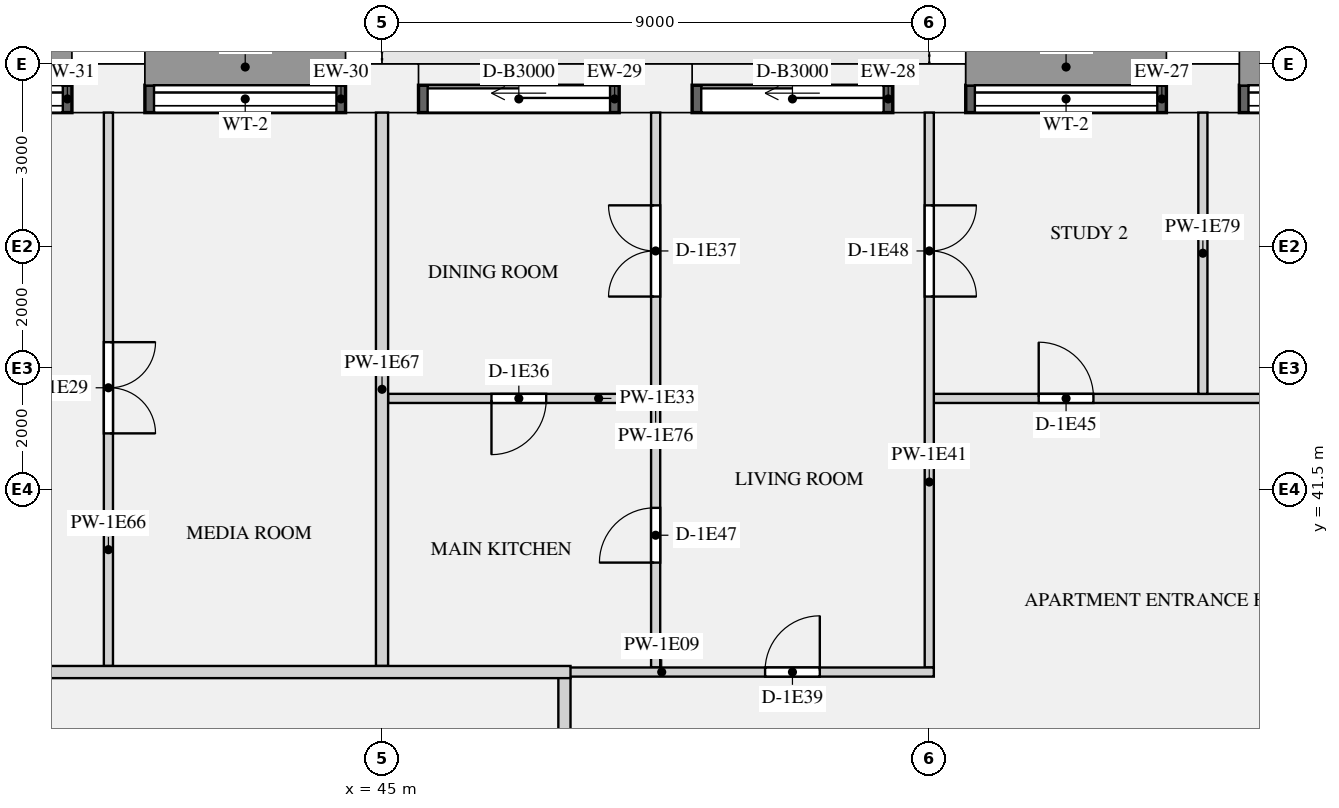
"""IFC4 building model, lengths in metres.
Left out: names, types, materials, properties, quantities, classifications, styles, units other than length and angle.
Written with IfcOpenShell. Run it as: python <this file> out.ifc"""

import sys

from ifc_helpers import new_model, si_unit, direction, frame, frame_2d, origin, origin_2d, place, context, subcontext, project, spatial, rectangle, extrude, element, fill, save


model = new_model("IFC4")
c1 = context("Model", 3, precision=1e-05, world=origin(), true_north=direction((0.0, 1.0)))
c2 = subcontext(c1, "Body", "Model", "MODEL_VIEW")
j1 = project(units=[si_unit("LENGTHUNIT", "METRE"), si_unit("PLANEANGLEUNIT", "RADIAN")], contexts=[c1])
p1 = place(None, origin())
s1 = spatial("IfcSite", under=j1, at=p1, CompositionType="ELEMENT")
p2 = place(p1, origin())
s2 = spatial("IfcBuilding", under=s1, at=p2, CompositionType="ELEMENT")
p3 = place(p2, frame((0.0, 0.0, 54.15)))
s3 = spatial("IfcBuildingStorey", under=s2, at=p3, CompositionType="ELEMENT", Elevation=54.15)
for number, where, z_axis, x_axis in (
    (1, (58.5, 48.1, 0.0), (0.0, 0.0, 1.0), (-1.0, 0.0, 0.0)),
    (2, (54.0, 48.1, 0.0), (0.0, 0.0, 1.0), (-1.0, 0.0, 0.0)),
    (3, (49.5, 48.1, 0.0), (0.0, 0.0, 1.0), (-1.0, 0.0, 0.0)),
    (4, (45.0, 48.1, 0.0), (0.0, 0.0, 1.0), (-1.0, 0.0, 0.0)),
    (5, (40.5, 48.1, 0.0), (0.0, 0.0, 1.0), (-1.0, 0.0, 0.0)),
):
    element("IfcColumn", number, at=place(p3, frame(where, z_axis=z_axis, x_axis=x_axis)), inside=s3, PredefinedType="USERDEFINED", context=c2, shape_type="SweptSolid", body=[
        extrude(rectangle(XDim=1.2, YDim=0.8, at=origin_2d()), origin(), (0.0, 0.0, 1.0), 3.15),
    ])
p4 = place(p3, frame((62.4, 47.925, 0.9), z_axis=(0.0, 0.0, 1.0), x_axis=(-1.0, 0.0, 0.0)))
e6 = element("IfcWall", 6, at=p4, inside=s3, PredefinedType="SOLIDWALL", context=c2, shape_type="SweptSolid", body=[
    extrude(rectangle(XDim=3.3, YDim=0.45, at=frame_2d((1.65, 0.0))), origin(), (0.0, 0.0, 1.0), 1.93),
])
p5 = place(p4, frame((0.15, 0.0, 0.15)))
e7 = element("IfcOpeningElement", 7, at=p5, cuts=e6, PredefinedType="OPENING", context=c2, shape_type="SweptSolid", body=[
    extrude(rectangle(XDim=3.0, YDim=1.5, at=frame_2d((1.5, 0.75))), frame((0.0, 0.235, 0.0), z_axis=(0.0, -1.0, 0.0), x_axis=(1.0, 0.0, 0.0)), (0.0, 0.0, 1.0), 0.47),
])
p6 = place(p3, frame((57.9, 47.925, 0.9), z_axis=(0.0, 0.0, 1.0), x_axis=(-1.0, 0.0, 0.0)))
e8 = element("IfcWall", 8, at=p6, inside=s3, PredefinedType="SOLIDWALL", context=c2, shape_type="SweptSolid", body=[
    extrude(rectangle(XDim=3.3, YDim=0.45, at=frame_2d((1.65, 0.0))), origin(), (0.0, 0.0, 1.0), 1.93),
])
p7 = place(p6, frame((0.15, 0.0, 0.15)))
e9 = element("IfcOpeningElement", 9, at=p7, cuts=e8, PredefinedType="OPENING", context=c2, shape_type="SweptSolid", body=[
    extrude(rectangle(XDim=3.0, YDim=1.5, at=frame_2d((1.5, 0.75))), frame((0.0, 0.235, 0.0), z_axis=(0.0, -1.0, 0.0), x_axis=(1.0, 0.0, 0.0)), (0.0, 0.0, 1.0), 0.47),
])
p8 = place(p3, frame((53.4, 47.925, 0.0), z_axis=(0.0, 0.0, 1.0), x_axis=(-1.0, 0.0, 0.0)))
e10 = element("IfcWall", 10, at=p8, inside=s3, PredefinedType="SOLIDWALL", context=c2, shape_type="SweptSolid", body=[
    extrude(rectangle(XDim=3.3, YDim=0.45, at=frame_2d((1.65, 0.0))), origin(), (0.0, 0.0, 1.0), 2.83),
])
p9 = place(p8, frame((0.15, 0.0, 0.0)))
e11 = element("IfcOpeningElement", 11, at=p9, cuts=e10, PredefinedType="OPENING", context=c2, shape_type="SweptSolid", body=[
    extrude(rectangle(XDim=3.0, YDim=2.3, at=frame_2d((1.5, 1.15))), frame((0.0, 0.235, 0.0), z_axis=(0.0, -1.0, 0.0), x_axis=(1.0, 0.0, 0.0)), (0.0, 0.0, 1.0), 0.47),
])
p10 = place(p3, frame((48.9, 47.925, 0.0), z_axis=(0.0, 0.0, 1.0), x_axis=(-1.0, 0.0, 0.0)))
e12 = element("IfcWall", 12, at=p10, inside=s3, PredefinedType="SOLIDWALL", context=c2, shape_type="SweptSolid", body=[
    extrude(rectangle(XDim=3.3, YDim=0.45, at=frame_2d((1.65, 0.0))), origin(), (0.0, 0.0, 1.0), 2.83),
])
p11 = place(p10, frame((0.15, 0.0, 0.0)))
e13 = element("IfcOpeningElement", 13, at=p11, cuts=e12, PredefinedType="OPENING", context=c2, shape_type="SweptSolid", body=[
    extrude(rectangle(XDim=3.0, YDim=2.3, at=frame_2d((1.5, 1.15))), frame((0.0, 0.235, 0.0), z_axis=(0.0, -1.0, 0.0), x_axis=(1.0, 0.0, 0.0)), (0.0, 0.0, 1.0), 0.47),
])
p12 = place(p3, frame((44.4, 47.925, 0.9), z_axis=(0.0, 0.0, 1.0), x_axis=(-1.0, 0.0, 0.0)))
e14 = element("IfcWall", 14, at=p12, inside=s3, PredefinedType="SOLIDWALL", context=c2, shape_type="SweptSolid", body=[
    extrude(rectangle(XDim=3.3, YDim=0.45, at=frame_2d((1.65, 0.0))), origin(), (0.0, 0.0, 1.0), 1.93),
])
p13 = place(p12, frame((0.15, 0.0, 0.15)))
e15 = element("IfcOpeningElement", 15, at=p13, cuts=e14, PredefinedType="OPENING", context=c2, shape_type="SweptSolid", body=[
    extrude(rectangle(XDim=3.0, YDim=1.5, at=frame_2d((1.5, 0.75))), frame((0.0, 0.235, 0.0), z_axis=(0.0, -1.0, 0.0), x_axis=(1.0, 0.0, 0.0)), (0.0, 0.0, 1.0), 0.47),
])
p14 = place(p3, frame((39.9, 47.925, 0.9), z_axis=(0.0, 0.0, 1.0), x_axis=(-1.0, 0.0, 0.0)))
e16 = element("IfcWall", 16, at=p14, inside=s3, PredefinedType="SOLIDWALL", context=c2, shape_type="SweptSolid", body=[
    extrude(rectangle(XDim=3.3, YDim=0.45, at=frame_2d((1.65, 0.0))), origin(), (0.0, 0.0, 1.0), 1.93),
])
p15 = place(p14, frame((0.15, 0.0, 0.15)))
e17 = element("IfcOpeningElement", 17, at=p15, cuts=e16, PredefinedType="OPENING", context=c2, shape_type="SweptSolid", body=[
    extrude(rectangle(XDim=3.0, YDim=1.5, at=frame_2d((1.5, 0.75))), frame((0.0, 0.235, 0.0), z_axis=(0.0, -1.0, 0.0), x_axis=(1.0, 0.0, 0.0)), (0.0, 0.0, 1.0), 0.47),
])
p16 = place(p3, frame((47.9, 38.5, 0.0), z_axis=(0.0, 0.0, 1.0), x_axis=(1.0, 0.0, 0.0)))
e18 = element("IfcWall", 18, at=p16, inside=s3, PredefinedType="PARTITIONING", context=c2, shape_type="SweptSolid", body=[
    extrude(rectangle(XDim=6.175, YDim=0.15, at=frame_2d((3.087, 0.0))), origin(), (0.0, 0.0, 1.0), 2.83),
])
p17 = place(p16, frame((3.4, 0.0, 0.0)))
e19 = element("IfcOpeningElement", 19, at=p17, cuts=e18, PredefinedType="OPENING", context=c2, shape_type="SweptSolid", body=[
    extrude(rectangle(XDim=0.9, YDim=2.1, at=frame_2d((0.45, 1.05))), frame((0.0, 0.085, 0.0), z_axis=(0.0, -1.0, 0.0), x_axis=(1.0, 0.0, 0.0)), (0.0, 0.0, 1.0), 0.17),
])
p18 = place(p3, frame((23.9, 38.5, 0.0), z_axis=(0.0, 0.0, 1.0), x_axis=(1.0, 0.0, 0.0)))
e20 = element("IfcWall", 20, at=p18, inside=s3, PredefinedType="PARTITIONING", context=c2, shape_type="SweptSolid", body=[
    extrude(rectangle(XDim=24.2, YDim=0.2, at=frame_2d((12.1, 0.0))), origin(), (0.0, 0.0, 1.0), 2.83),
])
p19 = place(p18, frame((3.55, 0.0, 0.0)))
e21 = element("IfcOpeningElement", 21, at=p19, cuts=e20, PredefinedType="OPENING", context=c2, shape_type="SweptSolid", body=[
    extrude(rectangle(XDim=1.1, YDim=2.1, at=frame_2d((0.55, 1.05))), frame((0.0, 0.11, 0.0), z_axis=(0.0, -1.0, 0.0), x_axis=(1.0, 0.0, 0.0)), (0.0, 0.0, 1.0), 0.22),
])
p20 = place(p3, frame((45.1, 43.0, 0.0), z_axis=(0.0, 0.0, 1.0), x_axis=(1.0, 0.0, 0.0)))
e22 = element("IfcWall", 22, at=p20, inside=s3, PredefinedType="PARTITIONING", context=c2, shape_type="SweptSolid", body=[
    extrude(rectangle(XDim=4.325, YDim=0.15, at=frame_2d((2.163, 0.0))), origin(), (0.0, 0.0, 1.0), 2.83),
])
p21 = place(p20, frame((1.7, 0.0, 0.0)))
e23 = element("IfcOpeningElement", 23, at=p21, cuts=e22, PredefinedType="OPENING", context=c2, shape_type="SweptSolid", body=[
    extrude(rectangle(XDim=0.9, YDim=2.1, at=frame_2d((0.45, 1.05))), frame((0.0, 0.085, 0.0), z_axis=(0.0, -1.0, 0.0), x_axis=(1.0, 0.0, 0.0)), (0.0, 0.0, 1.0), 0.17),
])
p22 = place(p3, frame((54.075, 43.0, 0.0), z_axis=(0.0, 0.0, 1.0), x_axis=(1.0, 0.0, 0.0)))
e24 = element("IfcWall", 24, at=p22, inside=s3, PredefinedType="PARTITIONING", context=c2, shape_type="SweptSolid", body=[
    extrude(rectangle(XDim=17.85, YDim=0.15, at=frame_2d((8.925, 0.0))), origin(), (0.0, 0.0, 1.0), 2.83),
])
p23 = place(p22, frame((6.225, 0.0, 0.0)))
e25 = element("IfcOpeningElement", 25, at=p23, cuts=e24, PredefinedType="OPENING", context=c2, shape_type="SweptSolid", body=[
    extrude(rectangle(XDim=0.9, YDim=2.1, at=frame_2d((0.45, 1.05))), frame((0.0, 0.085, 0.0), z_axis=(0.0, -1.0, 0.0), x_axis=(1.0, 0.0, 0.0)), (0.0, 0.0, 1.0), 0.17),
])
p24 = place(p22, frame((1.725, 0.0, 0.0)))
e26 = element("IfcOpeningElement", 26, at=p24, cuts=e24, PredefinedType="OPENING", context=c2, shape_type="SweptSolid", body=[
    extrude(rectangle(XDim=0.9, YDim=2.1, at=frame_2d((0.45, 1.05))), frame((0.0, 0.085, 0.0), z_axis=(0.0, -1.0, 0.0), x_axis=(1.0, 0.0, 0.0)), (0.0, 0.0, 1.0), 0.17),
])
p25 = place(p3, frame((54.0, 38.575, 0.0), z_axis=(0.0, 0.0, 1.0), x_axis=(0.0, 1.0, 0.0)))
e27 = element("IfcWall", 27, at=p25, inside=s3, PredefinedType="PARTITIONING", context=c2, shape_type="SweptSolid", body=[
    extrude(rectangle(XDim=9.125, YDim=0.15, at=frame_2d((4.562, 0.0))), origin(), (0.0, 0.0, 1.0), 2.83),
])
p26 = place(p25, frame((6.1, 0.0, 0.0)))
e28 = element("IfcOpeningElement", 28, at=p26, cuts=e27, PredefinedType="OPENING", context=c2, shape_type="SweptSolid", body=[
    extrude(rectangle(XDim=1.5, YDim=2.1, at=frame_2d((0.75, 1.05))), frame((0.0, 0.085, 0.0), z_axis=(0.0, -1.0, 0.0), x_axis=(1.0, 0.0, 0.0)), (0.0, 0.0, 1.0), 0.17),
])
p27 = place(p3, frame((48.0, 27.1, 0.0), z_axis=(0.0, 0.0, 1.0), x_axis=(0.0, 1.0, 0.0)))
e29 = element("IfcWall", 29, at=p27, inside=s3, PredefinedType="PARTITIONING", context=c2, shape_type="SweptSolid", body=[
    extrude(rectangle(XDim=11.325, YDim=0.2, at=frame_2d((5.663, 0.0))), origin(), (0.0, 0.0, 1.0), 2.83),
])
p28 = place(p27, frame((5.35, 0.0, 0.0)))
e30 = element("IfcOpeningElement", 30, at=p28, cuts=e29, PredefinedType="OPENING", context=c2, shape_type="SweptSolid", body=[
    extrude(rectangle(XDim=1.1, YDim=2.1, at=frame_2d((0.55, 1.05))), frame((0.0, 0.11, 0.0), z_axis=(0.0, -1.0, 0.0), x_axis=(1.0, 0.0, 0.0)), (0.0, 0.0, 1.0), 0.22),
])
p29 = place(p3, frame((40.5, 38.6, 0.0), z_axis=(0.0, 0.0, 1.0), x_axis=(0.0, 1.0, 0.0)))
e31 = element("IfcWall", 31, at=p29, inside=s3, PredefinedType="PARTITIONING", context=c2, shape_type="SweptSolid", body=[
    extrude(rectangle(XDim=9.1, YDim=0.15, at=frame_2d((4.55, 0.0))), origin(), (0.0, 0.0, 1.0), 2.83),
])
p30 = place(p29, frame((3.825, 0.0, 0.0)))
e32 = element("IfcOpeningElement", 32, at=p30, cuts=e31, PredefinedType="OPENING", context=c2, shape_type="SweptSolid", body=[
    extrude(rectangle(XDim=1.5, YDim=2.1, at=frame_2d((0.75, 1.05))), frame((0.0, 0.085, 0.0), z_axis=(0.0, -1.0, 0.0), x_axis=(1.0, 0.0, 0.0)), (0.0, 0.0, 1.0), 0.17),
])
p31 = place(p3, frame((45.0, 38.6, 0.0), z_axis=(0.0, 0.0, 1.0), x_axis=(0.0, 1.0, 0.0)))
e33 = element("IfcWall", 33, at=p31, inside=s3, PredefinedType="PARTITIONING", context=c2, shape_type="SweptSolid", body=[
    extrude(rectangle(XDim=9.1, YDim=0.2, at=frame_2d((4.55, 0.0))), origin(), (0.0, 0.0, 1.0), 2.83),
])
p32 = place(p3, frame((49.5, 38.575, 0.0), z_axis=(0.0, 0.0, 1.0), x_axis=(0.0, 1.0, 0.0)))
e34 = element("IfcWall", 34, at=p32, inside=s3, PredefinedType="PARTITIONING", context=c2, shape_type="SweptSolid", body=[
    extrude(rectangle(XDim=9.125, YDim=0.15, at=frame_2d((4.562, 0.0))), origin(), (0.0, 0.0, 1.0), 2.83),
])
p33 = place(p32, frame((6.1, 0.0, 0.0)))
e35 = element("IfcOpeningElement", 35, at=p33, cuts=e34, PredefinedType="OPENING", context=c2, shape_type="SweptSolid", body=[
    extrude(rectangle(XDim=1.5, YDim=2.1, at=frame_2d((0.75, 1.05))), frame((0.0, 0.085, 0.0), z_axis=(0.0, -1.0, 0.0), x_axis=(1.0, 0.0, 0.0)), (0.0, 0.0, 1.0), 0.17),
])
p34 = place(p32, frame((1.725, 0.0, 0.0)))
e36 = element("IfcOpeningElement", 36, at=p34, cuts=e34, PredefinedType="OPENING", context=c2, shape_type="SweptSolid", body=[
    extrude(rectangle(XDim=0.9, YDim=2.1, at=frame_2d((0.45, 1.05))), frame((0.0, 0.085, 0.0), z_axis=(0.0, -1.0, 0.0), x_axis=(1.0, 0.0, 0.0)), (0.0, 0.0, 1.0), 0.17),
])
p35 = place(p3, frame((58.5, 43.075, 0.0), z_axis=(0.0, 0.0, 1.0), x_axis=(0.0, 1.0, 0.0)))
e37 = element("IfcWall", 37, at=p35, inside=s3, PredefinedType="PARTITIONING", context=c2, shape_type="SweptSolid", body=[
    extrude(rectangle(XDim=4.625, YDim=0.15, at=frame_2d((2.312, 0.0))), origin(), (0.0, 0.0, 1.0), 2.83),
])
p36 = place(p5, origin())
e38 = element("IfcWindow", 38, at=p36, inside=s3, PartitioningType="SINGLE_PANEL", PredefinedType="WINDOW", context=c2, shape_type="SweptSolid", body=[
    extrude(rectangle(XDim=3.0, YDim=1.5, at=frame_2d((1.5, 0.75))), frame((0.0, -0.065, 0.0), z_axis=(0.0, -1.0, 0.0), x_axis=(1.0, 0.0, 0.0)), (0.0, 0.0, 1.0), 0.06),
])
fill(e7, e38)
p37 = place(p7, origin())
e39 = element("IfcWindow", 39, at=p37, inside=s3, PartitioningType="SINGLE_PANEL", PredefinedType="WINDOW", context=c2, shape_type="SweptSolid", body=[
    extrude(rectangle(XDim=3.0, YDim=1.5, at=frame_2d((1.5, 0.75))), frame((0.0, -0.065, 0.0), z_axis=(0.0, -1.0, 0.0), x_axis=(1.0, 0.0, 0.0)), (0.0, 0.0, 1.0), 0.06),
])
fill(e9, e39)
p38 = place(p9, origin())
e40 = element("IfcDoor", 40, at=p38, inside=s3, OperationType="SLIDING_TO_LEFT", PredefinedType="DOOR", context=c2, shape_type="SweptSolid", body=[
    extrude(rectangle(XDim=3.0, YDim=2.3, at=frame_2d((1.5, 1.15))), frame((0.0, -0.07, 0.0), z_axis=(0.0, -1.0, 0.0), x_axis=(1.0, 0.0, 0.0)), (0.0, 0.0, 1.0), 0.05),
])
fill(e11, e40)
p39 = place(p11, origin())
e41 = element("IfcDoor", 41, at=p39, inside=s3, OperationType="SLIDING_TO_LEFT", PredefinedType="DOOR", context=c2, shape_type="SweptSolid", body=[
    extrude(rectangle(XDim=3.0, YDim=2.3, at=frame_2d((1.5, 1.15))), frame((0.0, -0.07, 0.0), z_axis=(0.0, -1.0, 0.0), x_axis=(1.0, 0.0, 0.0)), (0.0, 0.0, 1.0), 0.05),
])
fill(e13, e41)
p40 = place(p13, origin())
e42 = element("IfcWindow", 42, at=p40, inside=s3, PartitioningType="SINGLE_PANEL", PredefinedType="WINDOW", context=c2, shape_type="SweptSolid", body=[
    extrude(rectangle(XDim=3.0, YDim=1.5, at=frame_2d((1.5, 0.75))), frame((0.0, -0.065, 0.0), z_axis=(0.0, -1.0, 0.0), x_axis=(1.0, 0.0, 0.0)), (0.0, 0.0, 1.0), 0.06),
])
fill(e15, e42)
p41 = place(p15, origin())
e43 = element("IfcWindow", 43, at=p41, inside=s3, PartitioningType="SINGLE_PANEL", PredefinedType="WINDOW", context=c2, shape_type="SweptSolid", body=[
    extrude(rectangle(XDim=3.0, YDim=1.5, at=frame_2d((1.5, 0.75))), frame((0.0, -0.065, 0.0), z_axis=(0.0, -1.0, 0.0), x_axis=(1.0, 0.0, 0.0)), (0.0, 0.0, 1.0), 0.06),
])
fill(e17, e43)
p42 = place(p30, frame((1.5, 0.0, 0.0), z_axis=(0.0, 0.0, 1.0), x_axis=(-1.0, 0.0, 0.0)))
e44 = element("IfcDoor", 44, at=p42, inside=s3, OperationType="DOUBLE_DOOR_SINGLE_SWING", PredefinedType="DOOR", context=c2, shape_type="SweptSolid", body=[
    extrude(rectangle(XDim=1.5, YDim=2.1, at=frame_2d((0.75, 1.05))), frame((0.0, 0.025, 0.0), z_axis=(0.0, -1.0, 0.0), x_axis=(1.0, 0.0, 0.0)), (0.0, 0.0, 1.0), 0.05),
])
fill(e32, e44)
p43 = place(p21, frame((0.9, 0.0, 0.0), z_axis=(0.0, 0.0, 1.0), x_axis=(-1.0, 0.0, 0.0)))
e45 = element("IfcDoor", 45, at=p43, inside=s3, OperationType="SINGLE_SWING_RIGHT", PredefinedType="DOOR", context=c2, shape_type="SweptSolid", body=[
    extrude(rectangle(XDim=0.9, YDim=2.1, at=frame_2d((0.45, 1.05))), frame((0.0, 0.025, 0.0), z_axis=(0.0, -1.0, 0.0), x_axis=(1.0, 0.0, 0.0)), (0.0, 0.0, 1.0), 0.05),
])
fill(e23, e45)
p44 = place(p33, origin())
e46 = element("IfcDoor", 46, at=p44, inside=s3, OperationType="DOUBLE_DOOR_SINGLE_SWING", PredefinedType="DOOR", context=c2, shape_type="SweptSolid", body=[
    extrude(rectangle(XDim=1.5, YDim=2.1, at=frame_2d((0.75, 1.05))), frame((0.0, 0.025, 0.0), z_axis=(0.0, -1.0, 0.0), x_axis=(1.0, 0.0, 0.0)), (0.0, 0.0, 1.0), 0.05),
])
fill(e35, e46)
p45 = place(p17, origin())
e47 = element("IfcDoor", 47, at=p45, inside=s3, OperationType="SINGLE_SWING_RIGHT", PredefinedType="DOOR", context=c2, shape_type="SweptSolid", body=[
    extrude(rectangle(XDim=0.9, YDim=2.1, at=frame_2d((0.45, 1.05))), frame((0.0, 0.025, 0.0), z_axis=(0.0, -1.0, 0.0), x_axis=(1.0, 0.0, 0.0)), (0.0, 0.0, 1.0), 0.05),
])
fill(e19, e47)
p46 = place(p24, origin())
e48 = element("IfcDoor", 48, at=p46, inside=s3, OperationType="SINGLE_SWING_LEFT", PredefinedType="DOOR", context=c2, shape_type="SweptSolid", body=[
    extrude(rectangle(XDim=0.9, YDim=2.1, at=frame_2d((0.45, 1.05))), frame((0.0, 0.025, 0.0), z_axis=(0.0, -1.0, 0.0), x_axis=(1.0, 0.0, 0.0)), (0.0, 0.0, 1.0), 0.05),
])
fill(e26, e48)
p47 = place(p34, origin())
e49 = element("IfcDoor", 49, at=p47, inside=s3, OperationType="SINGLE_SWING_LEFT", PredefinedType="DOOR", context=c2, shape_type="SweptSolid", body=[
    extrude(rectangle(XDim=0.9, YDim=2.1, at=frame_2d((0.45, 1.05))), frame((0.0, 0.025, 0.0), z_axis=(0.0, -1.0, 0.0), x_axis=(1.0, 0.0, 0.0)), (0.0, 0.0, 1.0), 0.05),
])
fill(e36, e49)
p48 = place(p26, frame((1.5, 0.0, 0.0), z_axis=(0.0, 0.0, 1.0), x_axis=(-1.0, 0.0, 0.0)))
e50 = element("IfcDoor", 50, at=p48, inside=s3, OperationType="DOUBLE_DOOR_SINGLE_SWING", PredefinedType="DOOR", context=c2, shape_type="SweptSolid", body=[
    extrude(rectangle(XDim=1.5, YDim=2.1, at=frame_2d((0.75, 1.05))), frame((0.0, 0.025, 0.0), z_axis=(0.0, -1.0, 0.0), x_axis=(1.0, 0.0, 0.0)), (0.0, 0.0, 1.0), 0.05),
])
fill(e28, e50)
save(model, sys.argv[1])
